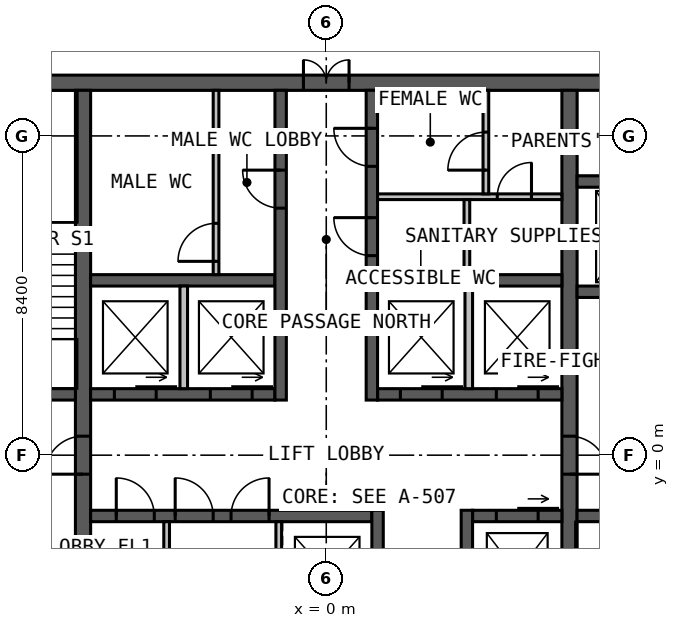
"""IFC4 building model, lengths in metres.
Left out: names, types, materials, properties, quantities, classifications, styles, units other than length and angle.
Written with IfcOpenShell. Run it as: python <this file> out.ifc"""

import sys

from ifc_helpers import new_model, si_unit, direction, frame, frame_2d, origin, place, context, subcontext, project, spatial, rectangle, extrude, element, fill, save


model = new_model("IFC4")
c1 = context("Model", 3, precision=1e-05, world=origin(), true_north=direction((0.0, 1.0)))
c2 = subcontext(c1, "Body", "Model", "MODEL_VIEW")
j1 = project(units=[si_unit("LENGTHUNIT", "METRE"), si_unit("PLANEANGLEUNIT", "RADIAN")], contexts=[c1])
p1 = place(None, origin())
s1 = spatial("IfcSite", under=j1, at=p1, CompositionType="ELEMENT")
p2 = place(p1, origin())
s2 = spatial("IfcBuilding", under=s1, at=p2, CompositionType="ELEMENT")
p3 = place(p2, frame((0.0, 0.0, 232.0)))
s3 = spatial("IfcBuildingStorey", under=s2, at=p3, CompositionType="ELEMENT", Elevation=232.0)
p4 = place(p3, frame((-10.0, 9.8, 0.0), z_axis=(0.0, 0.0, 1.0), x_axis=(1.0, 0.0, 0.0)))
e1 = element("IfcWall", 1, at=p4, inside=s3, PredefinedType="SOLIDWALL", context=c2, shape_type="SweptSolid", body=[
    extrude(rectangle(XDim=20.0, YDim=0.4, at=frame_2d((10.0, 0.0))), origin(), (0.0, 0.0, 1.0), 4.0),
])
p5 = place(p4, frame((9.4, 0.0, 0.0)))
e2 = element("IfcOpeningElement", 2, at=p5, cuts=e1, PredefinedType="OPENING", context=c2, shape_type="SweptSolid", body=[
    extrude(rectangle(XDim=1.2, YDim=2.2, at=frame_2d((0.6, 1.1))), frame((0.0, 0.21, 0.0), z_axis=(0.0, -1.0, 0.0), x_axis=(1.0, 0.0, 0.0)), (0.0, 0.0, 1.0), 0.42),
])
p6 = place(p3, frame((-6.4, -9.6, 0.0), z_axis=(0.0, 0.0, 1.0), x_axis=(0.0, 1.0, 0.0)))
e3 = element("IfcWall", 3, at=p6, inside=s3, PredefinedType="SOLIDWALL", context=c2, shape_type="SweptSolid", body=[
    extrude(rectangle(XDim=19.2, YDim=0.4, at=frame_2d((9.6, 0.0))), origin(), (0.0, 0.0, 1.0), 4.0),
])
p7 = place(p6, frame((9.1, 0.0, 0.0)))
e4 = element("IfcOpeningElement", 4, at=p7, cuts=e3, PredefinedType="OPENING", context=c2, shape_type="SweptSolid", body=[
    extrude(rectangle(XDim=1.0, YDim=2.2, at=frame_2d((0.5, 1.1))), frame((0.0, 0.21, 0.0), z_axis=(0.0, -1.0, 0.0), x_axis=(1.0, 0.0, 0.0)), (0.0, 0.0, 1.0), 0.42),
])
p8 = place(p3, frame((6.4, 9.6, 0.0), z_axis=(0.0, 0.0, 1.0), x_axis=(0.0, -1.0, 0.0)))
e5 = element("IfcWall", 5, at=p8, inside=s3, PredefinedType="SOLIDWALL", context=c2, shape_type="SweptSolid", body=[
    extrude(rectangle(XDim=19.2, YDim=0.4, at=frame_2d((9.6, 0.0))), origin(), (0.0, 0.0, 1.0), 4.0),
])
p9 = place(p8, frame((9.1, 0.0, 0.0)))
e6 = element("IfcOpeningElement", 6, at=p9, cuts=e5, PredefinedType="OPENING", context=c2, shape_type="SweptSolid", body=[
    extrude(rectangle(XDim=1.0, YDim=2.2, at=frame_2d((0.5, 1.1))), frame((0.0, 0.21, 0.0), z_axis=(0.0, -1.0, 0.0), x_axis=(1.0, 0.0, 0.0)), (0.0, 0.0, 1.0), 0.42),
])
p10 = place(p3, frame((-6.2, 1.6, 0.0), z_axis=(0.0, 0.0, 1.0), x_axis=(1.0, 0.0, 0.0)))
e7 = element("IfcWall", 7, at=p10, inside=s3, PredefinedType="SOLIDWALL", context=c2, shape_type="SweptSolid", body=[
    extrude(rectangle(XDim=4.85, YDim=0.3, at=frame_2d((2.425, 0.0))), origin(), (0.0, 0.0, 1.0), 4.0),
])
p11 = place(p10, frame((0.625, 0.0, 0.0)))
e8 = element("IfcOpeningElement", 8, at=p11, cuts=e7, PredefinedType="OPENING", context=c2, shape_type="SweptSolid", body=[
    extrude(rectangle(XDim=1.1, YDim=2.2, at=frame_2d((0.55, 1.1))), frame((0.0, 0.16, 0.0), z_axis=(0.0, -1.0, 0.0), x_axis=(1.0, 0.0, 0.0)), (0.0, 0.0, 1.0), 0.32),
])
p12 = place(p10, frame((3.15, 0.0, 0.0)))
e9 = element("IfcOpeningElement", 9, at=p12, cuts=e7, PredefinedType="OPENING", context=c2, shape_type="SweptSolid", body=[
    extrude(rectangle(XDim=1.1, YDim=2.2, at=frame_2d((0.55, 1.1))), frame((0.0, 0.16, 0.0), z_axis=(0.0, -1.0, 0.0), x_axis=(1.0, 0.0, 0.0)), (0.0, 0.0, 1.0), 0.32),
])
p13 = place(p3, frame((1.35, 1.6, 0.0), z_axis=(0.0, 0.0, 1.0), x_axis=(1.0, 0.0, 0.0)))
e10 = element("IfcWall", 10, at=p13, inside=s3, PredefinedType="SOLIDWALL", context=c2, shape_type="SweptSolid", body=[
    extrude(rectangle(XDim=4.85, YDim=0.3, at=frame_2d((2.425, 0.0))), origin(), (0.0, 0.0, 1.0), 4.0),
])
p14 = place(p13, frame((0.6, 0.0, 0.0)))
e11 = element("IfcOpeningElement", 11, at=p14, cuts=e10, PredefinedType="OPENING", context=c2, shape_type="SweptSolid", body=[
    extrude(rectangle(XDim=1.1, YDim=2.2, at=frame_2d((0.55, 1.1))), frame((0.0, 0.16, 0.0), z_axis=(0.0, -1.0, 0.0), x_axis=(1.0, 0.0, 0.0)), (0.0, 0.0, 1.0), 0.32),
])
p15 = place(p13, frame((3.125, 0.0, 0.0)))
e12 = element("IfcOpeningElement", 12, at=p15, cuts=e10, PredefinedType="OPENING", context=c2, shape_type="SweptSolid", body=[
    extrude(rectangle(XDim=1.1, YDim=2.2, at=frame_2d((0.55, 1.1))), frame((0.0, 0.16, 0.0), z_axis=(0.0, -1.0, 0.0), x_axis=(1.0, 0.0, 0.0)), (0.0, 0.0, 1.0), 0.32),
])
for number, where, z_axis, x_axis in (
    (13, (-6.2, 4.6, 0.0), (0.0, 0.0, 1.0), (1.0, 0.0, 0.0)),
    (14, (1.35, 4.6, 0.0), (0.0, 0.0, 1.0), (1.0, 0.0, 0.0)),
):
    element("IfcWall", number, at=place(p3, frame(where, z_axis=z_axis, x_axis=x_axis)), inside=s3, PredefinedType="SOLIDWALL", context=c2, shape_type="SweptSolid", body=[
        extrude(rectangle(XDim=4.85, YDim=0.3, at=frame_2d((2.425, 0.0))), origin(), (0.0, 0.0, 1.0), 4.0),
    ])
p16 = place(p3, frame((-1.2, 1.45, 0.0), z_axis=(0.0, 0.0, 1.0), x_axis=(0.0, 1.0, 0.0)))
e15 = element("IfcWall", 15, at=p16, inside=s3, PredefinedType="SOLIDWALL", context=c2, shape_type="SweptSolid", body=[
    extrude(rectangle(XDim=8.15, YDim=0.3, at=frame_2d((4.075, 0.0))), origin(), (0.0, 0.0, 1.0), 4.0),
])
p17 = place(p16, frame((5.05, 0.0, 0.0)))
e16 = element("IfcOpeningElement", 16, at=p17, cuts=e15, PredefinedType="OPENING", context=c2, shape_type="SweptSolid", body=[
    extrude(rectangle(XDim=1.0, YDim=2.2, at=frame_2d((0.5, 1.1))), frame((0.0, 0.16, 0.0), z_axis=(0.0, -1.0, 0.0), x_axis=(1.0, 0.0, 0.0)), (0.0, 0.0, 1.0), 0.32),
])
p18 = place(p3, frame((1.2, 1.45, 0.0), z_axis=(0.0, 0.0, 1.0), x_axis=(0.0, 1.0, 0.0)))
e17 = element("IfcWall", 17, at=p18, inside=s3, PredefinedType="SOLIDWALL", context=c2, shape_type="SweptSolid", body=[
    extrude(rectangle(XDim=8.15, YDim=0.3, at=frame_2d((4.075, 0.0))), origin(), (0.0, 0.0, 1.0), 4.0),
])
p19 = place(p18, frame((3.8, 0.0, 0.0)))
e18 = element("IfcOpeningElement", 18, at=p19, cuts=e17, PredefinedType="OPENING", context=c2, shape_type="SweptSolid", body=[
    extrude(rectangle(XDim=1.0, YDim=2.2, at=frame_2d((0.5, 1.1))), frame((0.0, 0.16, 0.0), z_axis=(0.0, -1.0, 0.0), x_axis=(1.0, 0.0, 0.0)), (0.0, 0.0, 1.0), 0.32),
])
p20 = place(p18, frame((6.15, 0.0, 0.0)))
e19 = element("IfcOpeningElement", 19, at=p20, cuts=e17, PredefinedType="OPENING", context=c2, shape_type="SweptSolid", body=[
    extrude(rectangle(XDim=1.0, YDim=2.2, at=frame_2d((0.5, 1.1))), frame((0.0, 0.16, 0.0), z_axis=(0.0, -1.0, 0.0), x_axis=(1.0, 0.0, 0.0)), (0.0, 0.0, 1.0), 0.32),
])
p21 = place(p3, frame((-6.2, -1.6, 0.0), z_axis=(0.0, 0.0, 1.0), x_axis=(1.0, 0.0, 0.0)))
e20 = element("IfcWall", 20, at=p21, inside=s3, PredefinedType="SOLIDWALL", context=c2, shape_type="SweptSolid", body=[
    extrude(rectangle(XDim=7.4, YDim=0.3, at=frame_2d((3.7, 0.0))), origin(), (0.0, 0.0, 1.0), 4.0),
])
p22 = place(p21, frame((0.675, 0.0, 0.0)))
e21 = element("IfcOpeningElement", 21, at=p22, cuts=e20, PredefinedType="OPENING", context=c2, shape_type="SweptSolid", body=[
    extrude(rectangle(XDim=1.0, YDim=2.2, at=frame_2d((0.5, 1.1))), frame((0.0, 0.16, 0.0), z_axis=(0.0, -1.0, 0.0), x_axis=(1.0, 0.0, 0.0)), (0.0, 0.0, 1.0), 0.32),
])
p23 = place(p21, frame((2.225, 0.0, 0.0)))
e22 = element("IfcOpeningElement", 22, at=p23, cuts=e20, PredefinedType="OPENING", context=c2, shape_type="SweptSolid", body=[
    extrude(rectangle(XDim=1.0, YDim=2.2, at=frame_2d((0.5, 1.1))), frame((0.0, 0.16, 0.0), z_axis=(0.0, -1.0, 0.0), x_axis=(1.0, 0.0, 0.0)), (0.0, 0.0, 1.0), 0.32),
])
p24 = place(p21, frame((3.695, 0.0, 0.0)))
e23 = element("IfcOpeningElement", 23, at=p24, cuts=e20, PredefinedType="OPENING", context=c2, shape_type="SweptSolid", body=[
    extrude(rectangle(XDim=1.0, YDim=2.2, at=frame_2d((0.5, 1.1))), frame((0.0, 0.16, 0.0), z_axis=(0.0, -1.0, 0.0), x_axis=(1.0, 0.0, 0.0)), (0.0, 0.0, 1.0), 0.32),
])
p25 = place(p3, frame((3.85, -1.6, 0.0), z_axis=(0.0, 0.0, 1.0), x_axis=(1.0, 0.0, 0.0)))
e24 = element("IfcWall", 24, at=p25, inside=s3, PredefinedType="SOLIDWALL", context=c2, shape_type="SweptSolid", body=[
    extrude(rectangle(XDim=2.35, YDim=0.3, at=frame_2d((1.175, 0.0))), origin(), (0.0, 0.0, 1.0), 4.0),
])
p26 = place(p25, frame((0.625, 0.0, 0.0)))
e25 = element("IfcOpeningElement", 25, at=p26, cuts=e24, PredefinedType="OPENING", context=c2, shape_type="SweptSolid", body=[
    extrude(rectangle(XDim=1.1, YDim=2.2, at=frame_2d((0.55, 1.1))), frame((0.0, 0.16, 0.0), z_axis=(0.0, -1.0, 0.0), x_axis=(1.0, 0.0, 0.0)), (0.0, 0.0, 1.0), 0.32),
])
p27 = place(p3, frame((1.35, -1.45, 0.0), z_axis=(0.0, 0.0, 1.0), x_axis=(0.0, -1.0, 0.0)))
e26 = element("IfcWall", 26, at=p27, inside=s3, PredefinedType="SOLIDWALL", context=c2, shape_type="SweptSolid", body=[
    extrude(rectangle(XDim=8.15, YDim=0.3, at=frame_2d((4.075, 0.0))), origin(), (0.0, 0.0, 1.0), 4.0),
])
p28 = place(p27, frame((6.0, 0.0, 0.0)))
e27 = element("IfcOpeningElement", 27, at=p28, cuts=e26, PredefinedType="OPENING", context=c2, shape_type="SweptSolid", body=[
    extrude(rectangle(XDim=1.0, YDim=2.2, at=frame_2d((0.5, 1.1))), frame((0.0, 0.16, 0.0), z_axis=(0.0, -1.0, 0.0), x_axis=(1.0, 0.0, 0.0)), (0.0, 0.0, 1.0), 0.32),
])
p29 = place(p27, frame((3.525, 0.0, 0.0)))
e28 = element("IfcOpeningElement", 28, at=p29, cuts=e26, PredefinedType="OPENING", context=c2, shape_type="SweptSolid", body=[
    extrude(rectangle(XDim=0.9, YDim=2.2, at=frame_2d((0.45, 1.1))), frame((0.0, 0.16, 0.0), z_axis=(0.0, -1.0, 0.0), x_axis=(1.0, 0.0, 0.0)), (0.0, 0.0, 1.0), 0.32),
])
p30 = place(p3, frame((3.7, -1.45, 0.0), z_axis=(0.0, 0.0, 1.0), x_axis=(0.0, -1.0, 0.0)))
e29 = element("IfcWall", 29, at=p30, inside=s3, PredefinedType="SOLIDWALL", context=c2, shape_type="SweptSolid", body=[
    extrude(rectangle(XDim=8.15, YDim=0.3, at=frame_2d((4.075, 0.0))), origin(), (0.0, 0.0, 1.0), 4.0),
])
p31 = place(p30, frame((5.1, 0.0, 0.0)))
e30 = element("IfcOpeningElement", 30, at=p31, cuts=e29, PredefinedType="OPENING", context=c2, shape_type="SweptSolid", body=[
    extrude(rectangle(XDim=0.9, YDim=2.2, at=frame_2d((0.45, 1.1))), frame((0.0, 0.16, 0.0), z_axis=(0.0, -1.0, 0.0), x_axis=(1.0, 0.0, 0.0)), (0.0, 0.0, 1.0), 0.32),
])
p32 = place(p3, frame((-9.6, 1.6, 0.0), z_axis=(0.0, 0.0, 1.0), x_axis=(1.0, 0.0, 0.0)))
e31 = element("IfcWall", 31, at=p32, inside=s3, PredefinedType="SOLIDWALL", context=c2, shape_type="SweptSolid", body=[
    extrude(rectangle(XDim=3.0, YDim=0.3, at=frame_2d((1.5, 0.0))), origin(), (0.0, 0.0, 1.0), 4.0),
])
p33 = place(p32, frame((1.0, 0.0, 0.0)))
e32 = element("IfcOpeningElement", 32, at=p33, cuts=e31, PredefinedType="OPENING", context=c2, shape_type="SweptSolid", body=[
    extrude(rectangle(XDim=1.0, YDim=2.2, at=frame_2d((0.5, 1.1))), frame((0.0, 0.16, 0.0), z_axis=(0.0, -1.0, 0.0), x_axis=(1.0, 0.0, 0.0)), (0.0, 0.0, 1.0), 0.32),
])
p34 = place(p3, frame((6.6, -1.6, 0.0), z_axis=(0.0, 0.0, 1.0), x_axis=(1.0, 0.0, 0.0)))
e33 = element("IfcWall", 33, at=p34, inside=s3, PredefinedType="SOLIDWALL", context=c2, shape_type="SweptSolid", body=[
    extrude(rectangle(XDim=3.0, YDim=0.3, at=frame_2d((1.5, 0.0))), origin(), (0.0, 0.0, 1.0), 4.0),
])
p35 = place(p34, frame((1.0, 0.0, 0.0)))
e34 = element("IfcOpeningElement", 34, at=p35, cuts=e33, PredefinedType="OPENING", context=c2, shape_type="SweptSolid", body=[
    extrude(rectangle(XDim=1.0, YDim=2.2, at=frame_2d((0.5, 1.1))), frame((0.0, 0.16, 0.0), z_axis=(0.0, -1.0, 0.0), x_axis=(1.0, 0.0, 0.0)), (0.0, 0.0, 1.0), 0.32),
])
p36 = place(p3, frame((6.6, 4.3, 0.0), z_axis=(0.0, 0.0, 1.0), x_axis=(1.0, 0.0, 0.0)))
e35 = element("IfcWall", 35, at=p36, inside=s3, PredefinedType="SOLIDWALL", context=c2, shape_type="SweptSolid", body=[
    extrude(rectangle(XDim=3.0, YDim=0.3, at=frame_2d((1.5, 0.0))), origin(), (0.0, 0.0, 1.0), 4.0),
])
p37 = place(p36, frame((0.75, 0.0, 0.0)))
e36 = element("IfcOpeningElement", 36, at=p37, cuts=e35, PredefinedType="OPENING", context=c2, shape_type="SweptSolid", body=[
    extrude(rectangle(XDim=1.1, YDim=2.2, at=frame_2d((0.55, 1.1))), frame((0.0, 0.16, 0.0), z_axis=(0.0, -1.0, 0.0), x_axis=(1.0, 0.0, 0.0)), (0.0, 0.0, 1.0), 0.32),
])
p38 = place(p3, frame((6.6, 7.2, 0.0), z_axis=(0.0, 0.0, 1.0), x_axis=(1.0, 0.0, 0.0)))
e37 = element("IfcWall", 37, at=p38, inside=s3, PredefinedType="SOLIDWALL", context=c2, shape_type="SweptSolid", body=[
    extrude(rectangle(XDim=3.0, YDim=0.3, at=frame_2d((1.5, 0.0))), origin(), (0.0, 0.0, 1.0), 4.0),
])
for number, where, z_axis, x_axis in (
    (38, (-3.75, 1.75, 0.0), (0.0, 0.0, 1.0), (0.0, 1.0, 0.0)),
    (39, (3.75, 1.75, 0.0), (0.0, 0.0, 1.0), (0.0, 1.0, 0.0)),
):
    element("IfcWall", number, at=place(p3, frame(where, z_axis=z_axis, x_axis=x_axis)), inside=s3, PredefinedType="SOLIDWALL", context=c2, shape_type="SweptSolid", body=[
        extrude(rectangle(XDim=2.7, YDim=0.2, at=frame_2d((1.35, 0.0))), origin(), (0.0, 0.0, 1.0), 3.75),
    ])
p39 = place(p3, frame((1.35, 6.8, 0.0), z_axis=(0.0, 0.0, 1.0), x_axis=(1.0, 0.0, 0.0)))
e40 = element("IfcWall", 40, at=p39, inside=s3, PredefinedType="PARTITIONING", context=c2, shape_type="SweptSolid", body=[
    extrude(rectangle(XDim=4.85, YDim=0.15, at=frame_2d((2.425, 0.0))), origin(), (0.0, 0.0, 1.0), 3.75),
])
p40 = place(p39, frame((3.15, 0.0, 0.0)))
e41 = element("IfcOpeningElement", 41, at=p40, cuts=e40, PredefinedType="OPENING", context=c2, shape_type="SweptSolid", body=[
    extrude(rectangle(XDim=0.9, YDim=2.2, at=frame_2d((0.45, 1.1))), frame((0.0, 0.085, 0.0), z_axis=(0.0, -1.0, 0.0), x_axis=(1.0, 0.0, 0.0)), (0.0, 0.0, 1.0), 0.17),
])
p41 = place(p3, frame((3.7, 4.75, 0.0), z_axis=(0.0, 0.0, 1.0), x_axis=(0.0, 1.0, 0.0)))
e42 = element("IfcWall", 42, at=p41, inside=s3, PredefinedType="PARTITIONING", context=c2, shape_type="SweptSolid", body=[
    extrude(rectangle(XDim=1.975, YDim=0.15, at=frame_2d((0.988, 0.0))), origin(), (0.0, 0.0, 1.0), 3.75),
])
p42 = place(p3, frame((4.2, 6.875, 0.0), z_axis=(0.0, 0.0, 1.0), x_axis=(0.0, 1.0, 0.0)))
e43 = element("IfcWall", 43, at=p42, inside=s3, PredefinedType="PARTITIONING", context=c2, shape_type="SweptSolid", body=[
    extrude(rectangle(XDim=2.725, YDim=0.15, at=frame_2d((1.363, 0.0))), origin(), (0.0, 0.0, 1.0), 3.75),
])
p43 = place(p42, frame((0.625, 0.0, 0.0)))
e44 = element("IfcOpeningElement", 44, at=p43, cuts=e43, PredefinedType="OPENING", context=c2, shape_type="SweptSolid", body=[
    extrude(rectangle(XDim=1.0, YDim=2.2, at=frame_2d((0.5, 1.1))), frame((0.0, 0.085, 0.0), z_axis=(0.0, -1.0, 0.0), x_axis=(1.0, 0.0, 0.0)), (0.0, 0.0, 1.0), 0.17),
])
p44 = place(p3, frame((-2.9, 4.75, 0.0), z_axis=(0.0, 0.0, 1.0), x_axis=(0.0, 1.0, 0.0)))
e45 = element("IfcWall", 45, at=p44, inside=s3, PredefinedType="PARTITIONING", context=c2, shape_type="SweptSolid", body=[
    extrude(rectangle(XDim=4.85, YDim=0.15, at=frame_2d((2.425, 0.0))), origin(), (0.0, 0.0, 1.0), 3.75),
])
p45 = place(p44, frame((0.35, 0.0, 0.0)))
e46 = element("IfcOpeningElement", 46, at=p45, cuts=e45, PredefinedType="OPENING", context=c2, shape_type="SweptSolid", body=[
    extrude(rectangle(XDim=1.0, YDim=2.2, at=frame_2d((0.5, 1.1))), frame((0.0, 0.085, 0.0), z_axis=(0.0, -1.0, 0.0), x_axis=(1.0, 0.0, 0.0)), (0.0, 0.0, 1.0), 0.17),
])
for number, where, z_axis, x_axis in (
    (47, (-4.2, -1.75, 0.0), (0.0, 0.0, 1.0), (0.0, -1.0, 0.0)),
    (48, (-1.25, -1.75, 0.0), (0.0, 0.0, 1.0), (0.0, -1.0, 0.0)),
):
    element("IfcWall", number, at=place(p3, frame(where, z_axis=z_axis, x_axis=x_axis)), inside=s3, PredefinedType="PARTITIONING", context=c2, shape_type="SweptSolid", body=[
        extrude(rectangle(XDim=2.7, YDim=0.15, at=frame_2d((1.35, 0.0))), origin(), (0.0, 0.0, 1.0), 3.75),
    ])
p46 = place(p5, origin())
e49 = element("IfcDoor", 49, at=p46, inside=s3, OperationType="DOUBLE_DOOR_SINGLE_SWING", PredefinedType="DOOR", context=c2, shape_type="SweptSolid", body=[
    extrude(rectangle(XDim=1.2, YDim=2.2, at=frame_2d((0.6, 1.1))), frame((0.0, 0.025, 0.0), z_axis=(0.0, -1.0, 0.0), x_axis=(1.0, 0.0, 0.0)), (0.0, 0.0, 1.0), 0.05),
])
fill(e2, e49)
p47 = place(p7, origin())
e50 = element("IfcDoor", 50, at=p47, inside=s3, OperationType="SINGLE_SWING_LEFT", PredefinedType="DOOR", context=c2, shape_type="SweptSolid", body=[
    extrude(rectangle(XDim=1.0, YDim=2.2, at=frame_2d((0.5, 1.1))), frame((0.0, 0.025, 0.0), z_axis=(0.0, -1.0, 0.0), x_axis=(1.0, 0.0, 0.0)), (0.0, 0.0, 1.0), 0.05),
])
fill(e4, e50)
p48 = place(p9, origin())
e51 = element("IfcDoor", 51, at=p48, inside=s3, OperationType="SINGLE_SWING_RIGHT", PredefinedType="DOOR", context=c2, shape_type="SweptSolid", body=[
    extrude(rectangle(XDim=1.0, YDim=2.2, at=frame_2d((0.5, 1.1))), frame((0.0, 0.025, 0.0), z_axis=(0.0, -1.0, 0.0), x_axis=(1.0, 0.0, 0.0)), (0.0, 0.0, 1.0), 0.05),
])
fill(e6, e51)
p49 = place(p17, origin())
e52 = element("IfcDoor", 52, at=p49, inside=s3, OperationType="SINGLE_SWING_RIGHT", PredefinedType="DOOR", context=c2, shape_type="SweptSolid", body=[
    extrude(rectangle(XDim=1.0, YDim=2.2, at=frame_2d((0.5, 1.1))), frame((0.0, 0.025, 0.0), z_axis=(0.0, -1.0, 0.0), x_axis=(1.0, 0.0, 0.0)), (0.0, 0.0, 1.0), 0.05),
])
fill(e16, e52)
p50 = place(p19, origin())
e53 = element("IfcDoor", 53, at=p50, inside=s3, OperationType="SINGLE_SWING_RIGHT", PredefinedType="DOOR", context=c2, shape_type="SweptSolid", body=[
    extrude(rectangle(XDim=1.0, YDim=2.2, at=frame_2d((0.5, 1.1))), frame((0.0, 0.025, 0.0), z_axis=(0.0, -1.0, 0.0), x_axis=(1.0, 0.0, 0.0)), (0.0, 0.0, 1.0), 0.05),
])
fill(e18, e53)
p51 = place(p20, origin())
e54 = element("IfcDoor", 54, at=p51, inside=s3, OperationType="SINGLE_SWING_RIGHT", PredefinedType="DOOR", context=c2, shape_type="SweptSolid", body=[
    extrude(rectangle(XDim=1.0, YDim=2.2, at=frame_2d((0.5, 1.1))), frame((0.0, 0.025, 0.0), z_axis=(0.0, -1.0, 0.0), x_axis=(1.0, 0.0, 0.0)), (0.0, 0.0, 1.0), 0.05),
])
fill(e19, e54)
p52 = place(p40, origin())
e55 = element("IfcDoor", 55, at=p52, inside=s3, OperationType="SINGLE_SWING_RIGHT", PredefinedType="DOOR", context=c2, shape_type="SweptSolid", body=[
    extrude(rectangle(XDim=0.9, YDim=2.2, at=frame_2d((0.45, 1.1))), frame((0.0, 0.025, 0.0), z_axis=(0.0, -1.0, 0.0), x_axis=(1.0, 0.0, 0.0)), (0.0, 0.0, 1.0), 0.05),
])
fill(e41, e55)
p53 = place(p43, origin())
e56 = element("IfcDoor", 56, at=p53, inside=s3, OperationType="SINGLE_SWING_LEFT", PredefinedType="DOOR", context=c2, shape_type="SweptSolid", body=[
    extrude(rectangle(XDim=1.0, YDim=2.2, at=frame_2d((0.5, 1.1))), frame((0.0, 0.025, 0.0), z_axis=(0.0, -1.0, 0.0), x_axis=(1.0, 0.0, 0.0)), (0.0, 0.0, 1.0), 0.05),
])
fill(e44, e56)
p54 = place(p45, origin())
e57 = element("IfcDoor", 57, at=p54, inside=s3, OperationType="SINGLE_SWING_LEFT", PredefinedType="DOOR", context=c2, shape_type="SweptSolid", body=[
    extrude(rectangle(XDim=1.0, YDim=2.2, at=frame_2d((0.5, 1.1))), frame((0.0, 0.025, 0.0), z_axis=(0.0, -1.0, 0.0), x_axis=(1.0, 0.0, 0.0)), (0.0, 0.0, 1.0), 0.05),
])
fill(e46, e57)
p55 = place(p22, origin())
e58 = element("IfcDoor", 58, at=p55, inside=s3, OperationType="SINGLE_SWING_LEFT", PredefinedType="DOOR", context=c2, shape_type="SweptSolid", body=[
    extrude(rectangle(XDim=1.0, YDim=2.2, at=frame_2d((0.5, 1.1))), frame((0.0, 0.025, 0.0), z_axis=(0.0, -1.0, 0.0), x_axis=(1.0, 0.0, 0.0)), (0.0, 0.0, 1.0), 0.05),
])
fill(e21, e58)
p56 = place(p23, origin())
e59 = element("IfcDoor", 59, at=p56, inside=s3, OperationType="SINGLE_SWING_LEFT", PredefinedType="DOOR", context=c2, shape_type="SweptSolid", body=[
    extrude(rectangle(XDim=1.0, YDim=2.2, at=frame_2d((0.5, 1.1))), frame((0.0, 0.025, 0.0), z_axis=(0.0, -1.0, 0.0), x_axis=(1.0, 0.0, 0.0)), (0.0, 0.0, 1.0), 0.05),
])
fill(e22, e59)
p57 = place(p24, origin())
e60 = element("IfcDoor", 60, at=p57, inside=s3, OperationType="SINGLE_SWING_RIGHT", PredefinedType="DOOR", context=c2, shape_type="SweptSolid", body=[
    extrude(rectangle(XDim=1.0, YDim=2.2, at=frame_2d((0.5, 1.1))), frame((0.0, 0.025, 0.0), z_axis=(0.0, -1.0, 0.0), x_axis=(1.0, 0.0, 0.0)), (0.0, 0.0, 1.0), 0.05),
])
fill(e23, e60)
p58 = place(p11, origin())
e61 = element("IfcDoor", 61, at=p58, inside=s3, OperationType="SLIDING_TO_LEFT", PredefinedType="DOOR", context=c2, shape_type="SweptSolid", body=[
    extrude(rectangle(XDim=1.1, YDim=2.2, at=frame_2d((0.55, 1.1))), frame((0.0, 0.025, 0.0), z_axis=(0.0, -1.0, 0.0), x_axis=(1.0, 0.0, 0.0)), (0.0, 0.0, 1.0), 0.05),
])
fill(e8, e61)
p59 = place(p12, origin())
e62 = element("IfcDoor", 62, at=p59, inside=s3, OperationType="SLIDING_TO_LEFT", PredefinedType="DOOR", context=c2, shape_type="SweptSolid", body=[
    extrude(rectangle(XDim=1.1, YDim=2.2, at=frame_2d((0.55, 1.1))), frame((0.0, 0.025, 0.0), z_axis=(0.0, -1.0, 0.0), x_axis=(1.0, 0.0, 0.0)), (0.0, 0.0, 1.0), 0.05),
])
fill(e9, e62)
p60 = place(p14, origin())
e63 = element("IfcDoor", 63, at=p60, inside=s3, OperationType="SLIDING_TO_LEFT", PredefinedType="DOOR", context=c2, shape_type="SweptSolid", body=[
    extrude(rectangle(XDim=1.1, YDim=2.2, at=frame_2d((0.55, 1.1))), frame((0.0, 0.025, 0.0), z_axis=(0.0, -1.0, 0.0), x_axis=(1.0, 0.0, 0.0)), (0.0, 0.0, 1.0), 0.05),
])
fill(e11, e63)
p61 = place(p15, origin())
e64 = element("IfcDoor", 64, at=p61, inside=s3, OperationType="SLIDING_TO_LEFT", PredefinedType="DOOR", context=c2, shape_type="SweptSolid", body=[
    extrude(rectangle(XDim=1.1, YDim=2.2, at=frame_2d((0.55, 1.1))), frame((0.0, 0.025, 0.0), z_axis=(0.0, -1.0, 0.0), x_axis=(1.0, 0.0, 0.0)), (0.0, 0.0, 1.0), 0.05),
])
fill(e12, e64)
p62 = place(p26, origin())
e65 = element("IfcDoor", 65, at=p62, inside=s3, OperationType="SLIDING_TO_LEFT", PredefinedType="DOOR", context=c2, shape_type="SweptSolid", body=[
    extrude(rectangle(XDim=1.1, YDim=2.2, at=frame_2d((0.55, 1.1))), frame((0.0, 0.025, 0.0), z_axis=(0.0, -1.0, 0.0), x_axis=(1.0, 0.0, 0.0)), (0.0, 0.0, 1.0), 0.05),
])
fill(e25, e65)
save(model, sys.argv[1])
